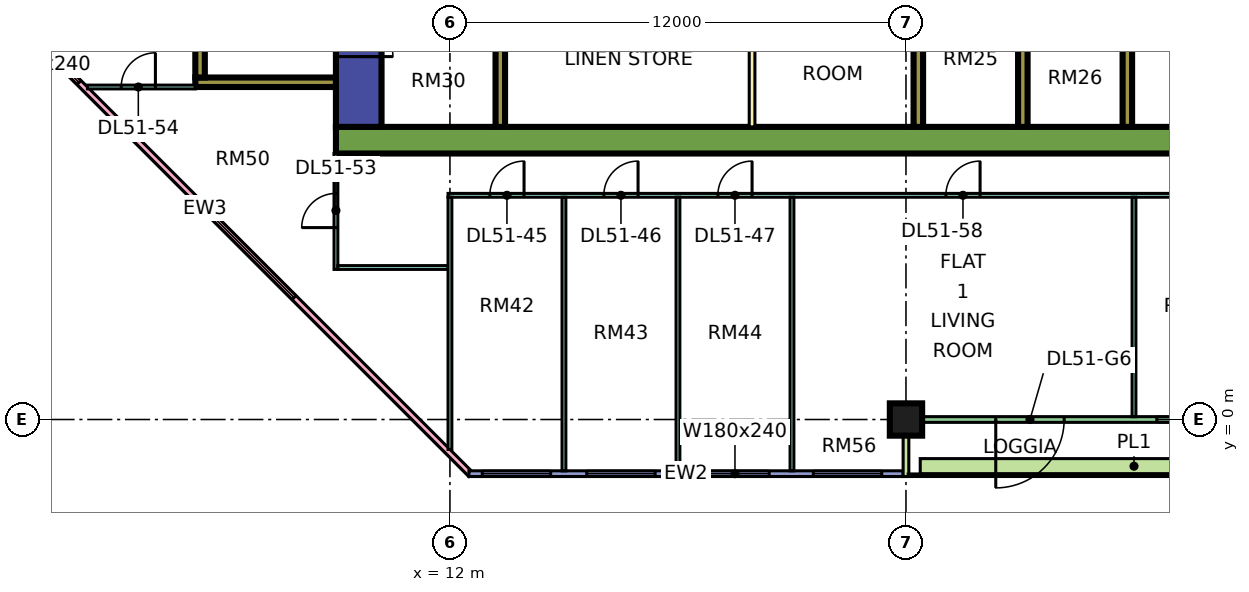
"""IFC4 building model, lengths in metres.
Left out: names, types, materials, properties, quantities, classifications, styles, units other than length and angle.
Written with IfcOpenShell. Run it as: python <this file> out.ifc"""

import sys

from ifc_helpers import new_model, si_unit, direction, frame, frame_2d, origin, origin_2d, place, context, subcontext, project, spatial, rectangle, extrude, element, fill, save


model = new_model("IFC4")
c1 = context("Model", 3, precision=1e-05, world=origin(), true_north=direction((0.0, 1.0)))
c2 = subcontext(c1, "Body", "Model", "MODEL_VIEW")
j1 = project(units=[si_unit("LENGTHUNIT", "METRE"), si_unit("PLANEANGLEUNIT", "RADIAN")], contexts=[c1])
p1 = place(None, origin())
s1 = spatial("IfcSite", under=j1, at=p1, CompositionType="ELEMENT")
p2 = place(p1, origin())
s2 = spatial("IfcBuilding", under=s1, at=p2, CompositionType="ELEMENT")
p3 = place(p2, frame((0.0, 0.0, 219.15)))
s3 = spatial("IfcBuildingStorey", under=s2, at=p3, CompositionType="ELEMENT", Elevation=219.15)
p4 = place(p3, frame((24.0, 0.0, 0.0), z_axis=(0.0, 0.0, 1.0), x_axis=(1.0, 0.0, 0.0)))
e1 = element("IfcColumn", 1, at=p4, inside=s3, PredefinedType="COLUMN", context=c2, shape_type="SweptSolid", body=[
    extrude(rectangle(XDim=0.85, YDim=0.85, at=origin_2d()), origin(), (0.0, 0.0, 1.0), 3.75),
])
p5 = place(p3, frame((9.0, 7.35, 0.0), z_axis=(0.0, 0.0, 1.0), x_axis=(1.0, 0.0, 0.0)))
e2 = element("IfcWall", 2, at=p5, inside=s3, PredefinedType="SHEAR", context=c2, shape_type="SweptSolid", body=[
    extrude(rectangle(XDim=25.0, YDim=0.7, at=frame_2d((12.5, 0.0))), origin(), (0.0, 0.0, 1.0), 3.75),
])
p6 = place(p3, frame((9.6, 7.7, 0.0), z_axis=(0.0, 0.0, 1.0), x_axis=(0.0, 1.0, 0.0)))
e3 = element("IfcWall", 3, at=p6, inside=s3, PredefinedType="SHEAR", context=c2, shape_type="SweptSolid", body=[
    extrude(rectangle(XDim=11.6, YDim=1.2, at=frame_2d((5.8, 0.0))), origin(), (0.0, 0.0, 1.0), 3.75),
])
p7 = place(p6, frame((4.175, 0.0, 0.0)))
e4 = element("IfcOpeningElement", 4, at=p7, cuts=e3, PredefinedType="OPENING", context=c2, shape_type="SweptSolid", body=[
    extrude(rectangle(XDim=1.1, YDim=2.2, at=frame_2d((0.55, 1.1))), frame((0.0, 0.61, 0.0), z_axis=(0.0, -1.0, 0.0), x_axis=(1.0, 0.0, 0.0)), (0.0, 0.0, 1.0), 1.22),
])
p8 = place(p6, frame((6.675, 0.0, 0.0)))
e5 = element("IfcOpeningElement", 5, at=p8, cuts=e3, PredefinedType="OPENING", context=c2, shape_type="SweptSolid", body=[
    extrude(rectangle(XDim=1.1, YDim=2.2, at=frame_2d((0.55, 1.1))), frame((0.0, 0.61, 0.0), z_axis=(0.0, -1.0, 0.0), x_axis=(1.0, 0.0, 0.0)), (0.0, 0.0, 1.0), 1.22),
])
p9 = place(p6, frame((9.55, 0.0, 0.0)))
e6 = element("IfcOpeningElement", 6, at=p9, cuts=e3, PredefinedType="OPENING", context=c2, shape_type="SweptSolid", body=[
    extrude(rectangle(XDim=1.1, YDim=2.2, at=frame_2d((0.55, 1.1))), frame((0.0, 0.61, 0.0), z_axis=(0.0, -1.0, 0.0), x_axis=(1.0, 0.0, 0.0)), (0.0, 0.0, 1.0), 1.22),
])
p10 = place(p6, frame((1.85, 0.0, 0.0)))
e7 = element("IfcOpeningElement", 7, at=p10, cuts=e3, PredefinedType="OPENING", context=c2, shape_type="SweptSolid", body=[
    extrude(rectangle(XDim=0.9, YDim=2.1, at=frame_2d((0.45, 1.05))), frame((0.0, 0.61, 0.0), z_axis=(0.0, -1.0, 0.0), x_axis=(1.0, 0.0, 0.0)), (0.0, 0.0, 1.0), 1.22),
])
p11 = place(p3, frame((13.325, 7.7, 0.0), z_axis=(0.0, 0.0, 1.0), x_axis=(0.0, 1.0, 0.0)))
e8 = element("IfcWall", 8, at=p11, inside=s3, PredefinedType="SHEAR", context=c2, shape_type="SweptSolid", body=[
    extrude(rectangle(XDim=11.6, YDim=0.25, at=frame_2d((5.8, 0.0))), origin(), (0.0, 0.0, 1.0), 3.75),
])
for number, where, z_axis, x_axis in (
    (9, (24.325, 7.7, 0.0), (0.0, 0.0, 1.0), (0.0, 1.0, 0.0)),
    (10, (27.075, 7.7, 0.0), (0.0, 0.0, 1.0), (0.0, 1.0, 0.0)),
    (11, (29.825, 7.7, 0.0), (0.0, 0.0, 1.0), (0.0, 1.0, 0.0)),
):
    element("IfcWall", number, at=place(p3, frame(where, z_axis=z_axis, x_axis=x_axis)), inside=s3, PredefinedType="SHEAR", context=c2, shape_type="SweptSolid", body=[
        extrude(rectangle(XDim=3.5, YDim=0.25, at=frame_2d((1.75, 0.0))), origin(), (0.0, 0.0, 1.0), 3.75),
    ])
p12 = place(p3, frame((5.3, 8.875, 0.0), z_axis=(0.0, 0.0, 1.0), x_axis=(1.0, 0.0, 0.0)))
e12 = element("IfcWall", 12, at=p12, inside=s3, PredefinedType="SHEAR", context=c2, shape_type="SweptSolid", body=[
    extrude(rectangle(XDim=3.7, YDim=0.25, at=frame_2d((1.85, 0.0))), origin(), (0.0, 0.0, 1.0), 3.75),
])
p13 = place(p3, frame((5.425, 9.0, 0.0), z_axis=(0.0, 0.0, 1.0), x_axis=(0.0, 1.0, 0.0)))
e13 = element("IfcWall", 13, at=p13, inside=s3, PredefinedType="SHEAR", context=c2, shape_type="SweptSolid", body=[
    extrude(rectangle(XDim=4.0, YDim=0.25, at=frame_2d((2.0, 0.0))), origin(), (0.0, 0.0, 1.0), 3.75),
])
p14 = place(p3, frame((-1.447, 12.553, 0.0), z_axis=(0.0, 0.0, 1.0), x_axis=(0.707106781187, -0.707106781187, 0.0)))
e14 = element("IfcWall", 14, at=p14, inside=s3, PredefinedType="SOLIDWALL", context=c2, shape_type="SweptSolid", body=[
    extrude(rectangle(XDim=19.799, YDim=0.15, at=frame_2d((9.899, 0.0))), origin(), (0.0, 0.0, 1.0), 3.35),
])
p15 = place(p14, frame((2.212, 0.0, 0.45)))
e15 = element("IfcOpeningElement", 15, at=p15, cuts=e14, PredefinedType="OPENING", context=c2, shape_type="SweptSolid", body=[
    extrude(rectangle(XDim=3.0, YDim=2.4, at=frame_2d((1.5, 1.2))), frame((0.0, 0.085, 0.0), z_axis=(0.0, -1.0, 0.0), x_axis=(1.0, 0.0, 0.0)), (0.0, 0.0, 1.0), 0.17),
])
p16 = place(p14, frame((10.216, 0.0, 0.45)))
e16 = element("IfcOpeningElement", 16, at=p16, cuts=e14, PredefinedType="OPENING", context=c2, shape_type="SweptSolid", body=[
    extrude(rectangle(XDim=3.0, YDim=2.4, at=frame_2d((1.5, 1.2))), frame((0.0, 0.085, 0.0), z_axis=(0.0, -1.0, 0.0), x_axis=(1.0, 0.0, 0.0)), (0.0, 0.0, 1.0), 0.17),
])
p17 = place(p3, frame((12.5, -1.425, 0.0), z_axis=(0.0, 0.0, 1.0), x_axis=(1.0, 0.0, 0.0)))
e17 = element("IfcWall", 17, at=p17, inside=s3, PredefinedType="SOLIDWALL", context=c2, shape_type="SweptSolid", body=[
    extrude(rectangle(XDim=11.425, YDim=0.15, at=frame_2d((5.712, 0.0))), origin(), (0.0, 0.0, 1.0), 3.35),
])
p18 = place(p17, frame((0.35, 0.0, 0.45)))
e18 = element("IfcOpeningElement", 18, at=p18, cuts=e17, PredefinedType="OPENING", context=c2, shape_type="SweptSolid", body=[
    extrude(rectangle(XDim=1.8, YDim=2.4, at=frame_2d((0.9, 1.2))), frame((0.0, 0.085, 0.0), z_axis=(0.0, -1.0, 0.0), x_axis=(1.0, 0.0, 0.0)), (0.0, 0.0, 1.0), 0.17),
])
p19 = place(p17, frame((3.1, 0.0, 0.45)))
e19 = element("IfcOpeningElement", 19, at=p19, cuts=e17, PredefinedType="OPENING", context=c2, shape_type="SweptSolid", body=[
    extrude(rectangle(XDim=1.8, YDim=2.4, at=frame_2d((0.9, 1.2))), frame((0.0, 0.085, 0.0), z_axis=(0.0, -1.0, 0.0), x_axis=(1.0, 0.0, 0.0)), (0.0, 0.0, 1.0), 0.17),
])
p20 = place(p17, frame((6.1, 0.0, 0.45)))
e20 = element("IfcOpeningElement", 20, at=p20, cuts=e17, PredefinedType="OPENING", context=c2, shape_type="SweptSolid", body=[
    extrude(rectangle(XDim=1.8, YDim=2.4, at=frame_2d((0.9, 1.2))), frame((0.0, 0.085, 0.0), z_axis=(0.0, -1.0, 0.0), x_axis=(1.0, 0.0, 0.0)), (0.0, 0.0, 1.0), 0.17),
])
p21 = place(p17, frame((9.062, 0.0, 0.45)))
e21 = element("IfcOpeningElement", 21, at=p21, cuts=e17, PredefinedType="OPENING", context=c2, shape_type="SweptSolid", body=[
    extrude(rectangle(XDim=1.8, YDim=2.4, at=frame_2d((0.9, 1.2))), frame((0.0, 0.085, 0.0), z_axis=(0.0, -1.0, 0.0), x_axis=(1.0, 0.0, 0.0)), (0.0, 0.0, 1.0), 0.17),
])
p22 = place(p3, frame((24.075, 0.0, 0.0), z_axis=(0.0, 0.0, 1.0), x_axis=(1.0, 0.0, 0.0)))
e22 = element("IfcWall", 22, at=p22, inside=s3, PredefinedType="SOLIDWALL", context=c2, shape_type="SweptSolid", body=[
    extrude(rectangle(XDim=11.85, YDim=0.15, at=frame_2d((5.925, 0.0))), origin(), (0.0, 0.0, 1.0), 3.35),
])
p23 = place(p22, frame((2.288, 0.0, 0.0)))
e23 = element("IfcOpeningElement", 23, at=p23, cuts=e22, PredefinedType="OPENING", context=c2, shape_type="SweptSolid", body=[
    extrude(rectangle(XDim=1.8, YDim=2.4, at=frame_2d((0.9, 1.2))), frame((0.0, 0.085, 0.0), z_axis=(0.0, -1.0, 0.0), x_axis=(1.0, 0.0, 0.0)), (0.0, 0.0, 1.0), 0.17),
])
p24 = place(p22, frame((6.525, 0.0, 0.45)))
e24 = element("IfcOpeningElement", 24, at=p24, cuts=e22, PredefinedType="OPENING", context=c2, shape_type="SweptSolid", body=[
    extrude(rectangle(XDim=1.8, YDim=2.4, at=frame_2d((0.9, 1.2))), frame((0.0, 0.085, 0.0), z_axis=(0.0, -1.0, 0.0), x_axis=(1.0, 0.0, 0.0)), (0.0, 0.0, 1.0), 0.17),
])
p25 = place(p22, frame((9.562, 0.0, 0.45)))
e25 = element("IfcOpeningElement", 25, at=p25, cuts=e22, PredefinedType="OPENING", context=c2, shape_type="SweptSolid", body=[
    extrude(rectangle(XDim=1.2, YDim=2.4, at=frame_2d((0.6, 1.2))), frame((0.0, 0.085, 0.0), z_axis=(0.0, -1.0, 0.0), x_axis=(1.0, 0.0, 0.0)), (0.0, 0.0, 1.0), 0.17),
])
p26 = place(p3, frame((24.0, -1.5, 0.0), z_axis=(0.0, 0.0, 1.0), x_axis=(0.0, 1.0, 0.0)))
e26 = element("IfcWall", 26, at=p26, inside=s3, PredefinedType="SOLIDWALL", context=c2, shape_type="SweptSolid", body=[
    extrude(rectangle(XDim=1.5, YDim=0.15, at=frame_2d((0.75, 0.0))), origin(), (0.0, 0.0, 1.0), 3.35),
])
p27 = place(p3, frame((24.375, -1.229, 0.0), z_axis=(0.0, 0.0, 1.0), x_axis=(1.0, 0.0, 0.0)))
e27 = element("IfcWall", 27, at=p27, inside=s3, PredefinedType="SOLIDWALL", context=c2, shape_type="SweptSolid", body=[
    extrude(rectangle(XDim=11.25, YDim=0.4, at=frame_2d((5.625, 0.0))), origin(), (0.0, 0.0, 1.0), 0.7),
])
p28 = place(p3, frame((19.95, 7.7, 0.0), z_axis=(0.0, 0.0, 1.0), x_axis=(0.0, 1.0, 0.0)))
e28 = element("IfcWall", 28, at=p28, inside=s3, PredefinedType="PARTITIONING", context=c2, shape_type="SweptSolid", body=[
    extrude(rectangle(XDim=3.5, YDim=0.15, at=frame_2d((1.75, 0.0))), origin(), (0.0, 0.0, 1.0), 3.35),
])
p29 = place(p3, frame((2.461, 8.75, 0.0), z_axis=(0.0, 0.0, 1.0), x_axis=(1.0, 0.0, 0.0)))
e29 = element("IfcWall", 29, at=p29, inside=s3, PredefinedType="PARTITIONING", context=c2, shape_type="SweptSolid", body=[
    extrude(rectangle(XDim=2.839, YDim=0.1, at=frame_2d((1.419, 0.0))), origin(), (0.0, 0.0, 1.0), 3.35),
])
p30 = place(p29, frame((0.889, 0.0, 0.0)))
e30 = element("IfcOpeningElement", 30, at=p30, cuts=e29, PredefinedType="OPENING", context=c2, shape_type="SweptSolid", body=[
    extrude(rectangle(XDim=0.9, YDim=2.1, at=frame_2d((0.45, 1.05))), frame((0.0, 0.06, 0.0), z_axis=(0.0, -1.0, 0.0), x_axis=(1.0, 0.0, 0.0)), (0.0, 0.0, 1.0), 0.12),
])
p31 = place(p3, frame((9.0, 3.95, 0.0), z_axis=(0.0, 0.0, 1.0), x_axis=(0.0, 1.0, 0.0)))
e31 = element("IfcWall", 31, at=p31, inside=s3, PredefinedType="PARTITIONING", context=c2, shape_type="SweptSolid", body=[
    extrude(rectangle(XDim=3.05, YDim=0.1, at=frame_2d((1.525, 0.0))), origin(), (0.0, 0.0, 1.0), 3.35),
])
p32 = place(p31, frame((1.1, 0.0, 0.0)))
e32 = element("IfcOpeningElement", 32, at=p32, cuts=e31, PredefinedType="OPENING", context=c2, shape_type="SweptSolid", body=[
    extrude(rectangle(XDim=0.9, YDim=2.1, at=frame_2d((0.45, 1.05))), frame((0.0, 0.06, 0.0), z_axis=(0.0, -1.0, 0.0), x_axis=(1.0, 0.0, 0.0)), (0.0, 0.0, 1.0), 0.12),
])
p33 = place(p3, frame((9.05, 4.0, 0.0), z_axis=(0.0, 0.0, 1.0), x_axis=(1.0, 0.0, 0.0)))
e33 = element("IfcWall", 33, at=p33, inside=s3, PredefinedType="PARTITIONING", context=c2, shape_type="SweptSolid", body=[
    extrude(rectangle(XDim=2.9, YDim=0.1, at=frame_2d((1.45, 0.0))), origin(), (0.0, 0.0, 1.0), 3.35),
])
p34 = place(p3, frame((11.95, 5.9, 0.0), z_axis=(0.0, 0.0, 1.0), x_axis=(1.0, 0.0, 0.0)))
e34 = element("IfcWall", 34, at=p34, inside=s3, PredefinedType="PARTITIONING", context=c2, shape_type="SweptSolid", body=[
    extrude(rectangle(XDim=21.1, YDim=0.1, at=frame_2d((10.55, 0.0))), origin(), (0.0, 0.0, 1.0), 3.35),
])
p35 = place(p34, frame((1.1, 0.0, 0.0)))
e35 = element("IfcOpeningElement", 35, at=p35, cuts=e34, PredefinedType="OPENING", context=c2, shape_type="SweptSolid", body=[
    extrude(rectangle(XDim=0.9, YDim=2.1, at=frame_2d((0.45, 1.05))), frame((0.0, 0.06, 0.0), z_axis=(0.0, -1.0, 0.0), x_axis=(1.0, 0.0, 0.0)), (0.0, 0.0, 1.0), 0.12),
])
p36 = place(p34, frame((4.1, 0.0, 0.0)))
e36 = element("IfcOpeningElement", 36, at=p36, cuts=e34, PredefinedType="OPENING", context=c2, shape_type="SweptSolid", body=[
    extrude(rectangle(XDim=0.9, YDim=2.1, at=frame_2d((0.45, 1.05))), frame((0.0, 0.06, 0.0), z_axis=(0.0, -1.0, 0.0), x_axis=(1.0, 0.0, 0.0)), (0.0, 0.0, 1.0), 0.12),
])
p37 = place(p34, frame((7.1, 0.0, 0.0)))
e37 = element("IfcOpeningElement", 37, at=p37, cuts=e34, PredefinedType="OPENING", context=c2, shape_type="SweptSolid", body=[
    extrude(rectangle(XDim=0.9, YDim=2.1, at=frame_2d((0.45, 1.05))), frame((0.0, 0.06, 0.0), z_axis=(0.0, -1.0, 0.0), x_axis=(1.0, 0.0, 0.0)), (0.0, 0.0, 1.0), 0.12),
])
p38 = place(p34, frame((13.1, 0.0, 0.0)))
e38 = element("IfcOpeningElement", 38, at=p38, cuts=e34, PredefinedType="OPENING", context=c2, shape_type="SweptSolid", body=[
    extrude(rectangle(XDim=0.9, YDim=2.1, at=frame_2d((0.45, 1.05))), frame((0.0, 0.06, 0.0), z_axis=(0.0, -1.0, 0.0), x_axis=(1.0, 0.0, 0.0)), (0.0, 0.0, 1.0), 0.12),
])
p39 = place(p3, frame((12.0, -0.788, 0.0), z_axis=(0.0, 0.0, 1.0), x_axis=(0.0, 1.0, 0.0)))
e39 = element("IfcWall", 39, at=p39, inside=s3, PredefinedType="PARTITIONING", context=c2, shape_type="SweptSolid", body=[
    extrude(rectangle(XDim=6.638, YDim=0.1, at=frame_2d((3.319, 0.0))), origin(), (0.0, 0.0, 1.0), 3.35),
])
for number, where, z_axis, x_axis in (
    (40, (15.0, -1.351, 0.0), (0.0, 0.0, 1.0), (0.0, 1.0, 0.0)),
    (41, (18.0, -1.351, 0.0), (0.0, 0.0, 1.0), (0.0, 1.0, 0.0)),
):
    element("IfcWall", number, at=place(p3, frame(where, z_axis=z_axis, x_axis=x_axis)), inside=s3, PredefinedType="PARTITIONING", context=c2, shape_type="SweptSolid", body=[
        extrude(rectangle(XDim=7.201, YDim=0.1, at=frame_2d((3.601, 0.0))), origin(), (0.0, 0.0, 1.0), 3.35),
    ])
p40 = place(p3, frame((21.0, -1.35, 0.0), z_axis=(0.0, 0.0, 1.0), x_axis=(0.0, 1.0, 0.0)))
e42 = element("IfcWall", 42, at=p40, inside=s3, PredefinedType="PARTITIONING", context=c2, shape_type="SweptSolid", body=[
    extrude(rectangle(XDim=7.2, YDim=0.1, at=frame_2d((3.6, 0.0))), origin(), (0.0, 0.0, 1.0), 3.35),
])
p41 = place(p3, frame((30.0, 0.074, 0.0), z_axis=(0.0, 0.0, 1.0), x_axis=(0.0, 1.0, 0.0)))
e43 = element("IfcWall", 43, at=p41, inside=s3, PredefinedType="PARTITIONING", context=c2, shape_type="SweptSolid", body=[
    extrude(rectangle(XDim=5.776, YDim=0.1, at=frame_2d((2.888, 0.0))), origin(), (0.0, 0.0, 1.0), 3.35),
])
p42 = place(p15, origin())
e44 = element("IfcWindow", 44, at=p42, inside=s3, PartitioningType="SINGLE_PANEL", PredefinedType="WINDOW", context=c2, shape_type="SweptSolid", body=[
    extrude(rectangle(XDim=3.0, YDim=2.4, at=frame_2d((1.5, 1.2))), frame((0.0, 0.03, 0.0), z_axis=(0.0, -1.0, 0.0), x_axis=(1.0, 0.0, 0.0)), (0.0, 0.0, 1.0), 0.06),
])
fill(e15, e44)
p43 = place(p16, origin())
e45 = element("IfcWindow", 45, at=p43, inside=s3, PartitioningType="SINGLE_PANEL", PredefinedType="WINDOW", context=c2, shape_type="SweptSolid", body=[
    extrude(rectangle(XDim=3.0, YDim=2.4, at=frame_2d((1.5, 1.2))), frame((0.0, 0.03, 0.0), z_axis=(0.0, -1.0, 0.0), x_axis=(1.0, 0.0, 0.0)), (0.0, 0.0, 1.0), 0.06),
])
fill(e16, e45)
p44 = place(p18, origin())
e46 = element("IfcWindow", 46, at=p44, inside=s3, PartitioningType="SINGLE_PANEL", PredefinedType="WINDOW", context=c2, shape_type="SweptSolid", body=[
    extrude(rectangle(XDim=1.8, YDim=2.4, at=frame_2d((0.9, 1.2))), frame((0.0, 0.03, 0.0), z_axis=(0.0, -1.0, 0.0), x_axis=(1.0, 0.0, 0.0)), (0.0, 0.0, 1.0), 0.06),
])
fill(e18, e46)
p45 = place(p19, origin())
e47 = element("IfcWindow", 47, at=p45, inside=s3, PartitioningType="SINGLE_PANEL", PredefinedType="WINDOW", context=c2, shape_type="SweptSolid", body=[
    extrude(rectangle(XDim=1.8, YDim=2.4, at=frame_2d((0.9, 1.2))), frame((0.0, 0.03, 0.0), z_axis=(0.0, -1.0, 0.0), x_axis=(1.0, 0.0, 0.0)), (0.0, 0.0, 1.0), 0.06),
])
fill(e19, e47)
p46 = place(p20, origin())
e48 = element("IfcWindow", 48, at=p46, inside=s3, PartitioningType="SINGLE_PANEL", PredefinedType="WINDOW", context=c2, shape_type="SweptSolid", body=[
    extrude(rectangle(XDim=1.8, YDim=2.4, at=frame_2d((0.9, 1.2))), frame((0.0, 0.03, 0.0), z_axis=(0.0, -1.0, 0.0), x_axis=(1.0, 0.0, 0.0)), (0.0, 0.0, 1.0), 0.06),
])
fill(e20, e48)
p47 = place(p21, origin())
e49 = element("IfcWindow", 49, at=p47, inside=s3, PartitioningType="SINGLE_PANEL", PredefinedType="WINDOW", context=c2, shape_type="SweptSolid", body=[
    extrude(rectangle(XDim=1.8, YDim=2.4, at=frame_2d((0.9, 1.2))), frame((0.0, 0.03, 0.0), z_axis=(0.0, -1.0, 0.0), x_axis=(1.0, 0.0, 0.0)), (0.0, 0.0, 1.0), 0.06),
])
fill(e21, e49)
p48 = place(p23, frame((1.8, 0.0, 0.0), z_axis=(0.0, 0.0, 1.0), x_axis=(-1.0, 0.0, 0.0)))
e50 = element("IfcDoor", 50, at=p48, inside=s3, OperationType="DOUBLE_DOOR_SINGLE_SWING", PredefinedType="DOOR", context=c2, shape_type="SweptSolid", body=[
    extrude(rectangle(XDim=1.8, YDim=2.4, at=frame_2d((0.9, 1.2))), frame((0.0, 0.025, 0.0), z_axis=(0.0, -1.0, 0.0), x_axis=(1.0, 0.0, 0.0)), (0.0, 0.0, 1.0), 0.05),
])
fill(e23, e50)
p49 = place(p24, origin())
e51 = element("IfcWindow", 51, at=p49, inside=s3, PartitioningType="SINGLE_PANEL", PredefinedType="WINDOW", context=c2, shape_type="SweptSolid", body=[
    extrude(rectangle(XDim=1.8, YDim=2.4, at=frame_2d((0.9, 1.2))), frame((0.0, 0.03, 0.0), z_axis=(0.0, -1.0, 0.0), x_axis=(1.0, 0.0, 0.0)), (0.0, 0.0, 1.0), 0.06),
])
fill(e24, e51)
p50 = place(p10, frame((0.9, 0.0, 0.0), z_axis=(0.0, 0.0, 1.0), x_axis=(-1.0, 0.0, 0.0)))
e52 = element("IfcDoor", 52, at=p50, inside=s3, OperationType="SINGLE_SWING_LEFT", PredefinedType="DOOR", context=c2, shape_type="SweptSolid", body=[
    extrude(rectangle(XDim=0.9, YDim=2.1, at=frame_2d((0.45, 1.05))), frame((0.0, 0.025, 0.0), z_axis=(0.0, -1.0, 0.0), x_axis=(1.0, 0.0, 0.0)), (0.0, 0.0, 1.0), 0.05),
])
fill(e7, e52)
p51 = place(p35, frame((0.9, 0.0, 0.0), z_axis=(0.0, 0.0, 1.0), x_axis=(-1.0, 0.0, 0.0)))
e53 = element("IfcDoor", 53, at=p51, inside=s3, OperationType="SINGLE_SWING_RIGHT", PredefinedType="DOOR", context=c2, shape_type="SweptSolid", body=[
    extrude(rectangle(XDim=0.9, YDim=2.1, at=frame_2d((0.45, 1.05))), frame((0.0, 0.025, 0.0), z_axis=(0.0, -1.0, 0.0), x_axis=(1.0, 0.0, 0.0)), (0.0, 0.0, 1.0), 0.05),
])
fill(e35, e53)
p52 = place(p36, frame((0.9, 0.0, 0.0), z_axis=(0.0, 0.0, 1.0), x_axis=(-1.0, 0.0, 0.0)))
e54 = element("IfcDoor", 54, at=p52, inside=s3, OperationType="SINGLE_SWING_RIGHT", PredefinedType="DOOR", context=c2, shape_type="SweptSolid", body=[
    extrude(rectangle(XDim=0.9, YDim=2.1, at=frame_2d((0.45, 1.05))), frame((0.0, 0.025, 0.0), z_axis=(0.0, -1.0, 0.0), x_axis=(1.0, 0.0, 0.0)), (0.0, 0.0, 1.0), 0.05),
])
fill(e36, e54)
p53 = place(p37, frame((0.9, 0.0, 0.0), z_axis=(0.0, 0.0, 1.0), x_axis=(-1.0, 0.0, 0.0)))
e55 = element("IfcDoor", 55, at=p53, inside=s3, OperationType="SINGLE_SWING_RIGHT", PredefinedType="DOOR", context=c2, shape_type="SweptSolid", body=[
    extrude(rectangle(XDim=0.9, YDim=2.1, at=frame_2d((0.45, 1.05))), frame((0.0, 0.025, 0.0), z_axis=(0.0, -1.0, 0.0), x_axis=(1.0, 0.0, 0.0)), (0.0, 0.0, 1.0), 0.05),
])
fill(e37, e55)
p54 = place(p32, origin())
e56 = element("IfcDoor", 56, at=p54, inside=s3, OperationType="SINGLE_SWING_LEFT", PredefinedType="DOOR", context=c2, shape_type="SweptSolid", body=[
    extrude(rectangle(XDim=0.9, YDim=2.1, at=frame_2d((0.45, 1.05))), frame((0.0, 0.025, 0.0), z_axis=(0.0, -1.0, 0.0), x_axis=(1.0, 0.0, 0.0)), (0.0, 0.0, 1.0), 0.05),
])
fill(e32, e56)
p55 = place(p30, frame((0.9, 0.0, 0.0), z_axis=(0.0, 0.0, 1.0), x_axis=(-1.0, 0.0, 0.0)))
e57 = element("IfcDoor", 57, at=p55, inside=s3, OperationType="SINGLE_SWING_RIGHT", PredefinedType="DOOR", context=c2, shape_type="SweptSolid", body=[
    extrude(rectangle(XDim=0.9, YDim=2.1, at=frame_2d((0.45, 1.05))), frame((0.0, 0.025, 0.0), z_axis=(0.0, -1.0, 0.0), x_axis=(1.0, 0.0, 0.0)), (0.0, 0.0, 1.0), 0.05),
])
fill(e30, e57)
p56 = place(p38, frame((0.9, 0.0, 0.0), z_axis=(0.0, 0.0, 1.0), x_axis=(-1.0, 0.0, 0.0)))
e58 = element("IfcDoor", 58, at=p56, inside=s3, OperationType="SINGLE_SWING_RIGHT", PredefinedType="DOOR", context=c2, shape_type="SweptSolid", body=[
    extrude(rectangle(XDim=0.9, YDim=2.1, at=frame_2d((0.45, 1.05))), frame((0.0, 0.025, 0.0), z_axis=(0.0, -1.0, 0.0), x_axis=(1.0, 0.0, 0.0)), (0.0, 0.0, 1.0), 0.05),
])
fill(e38, e58)
save(model, sys.argv[1])
